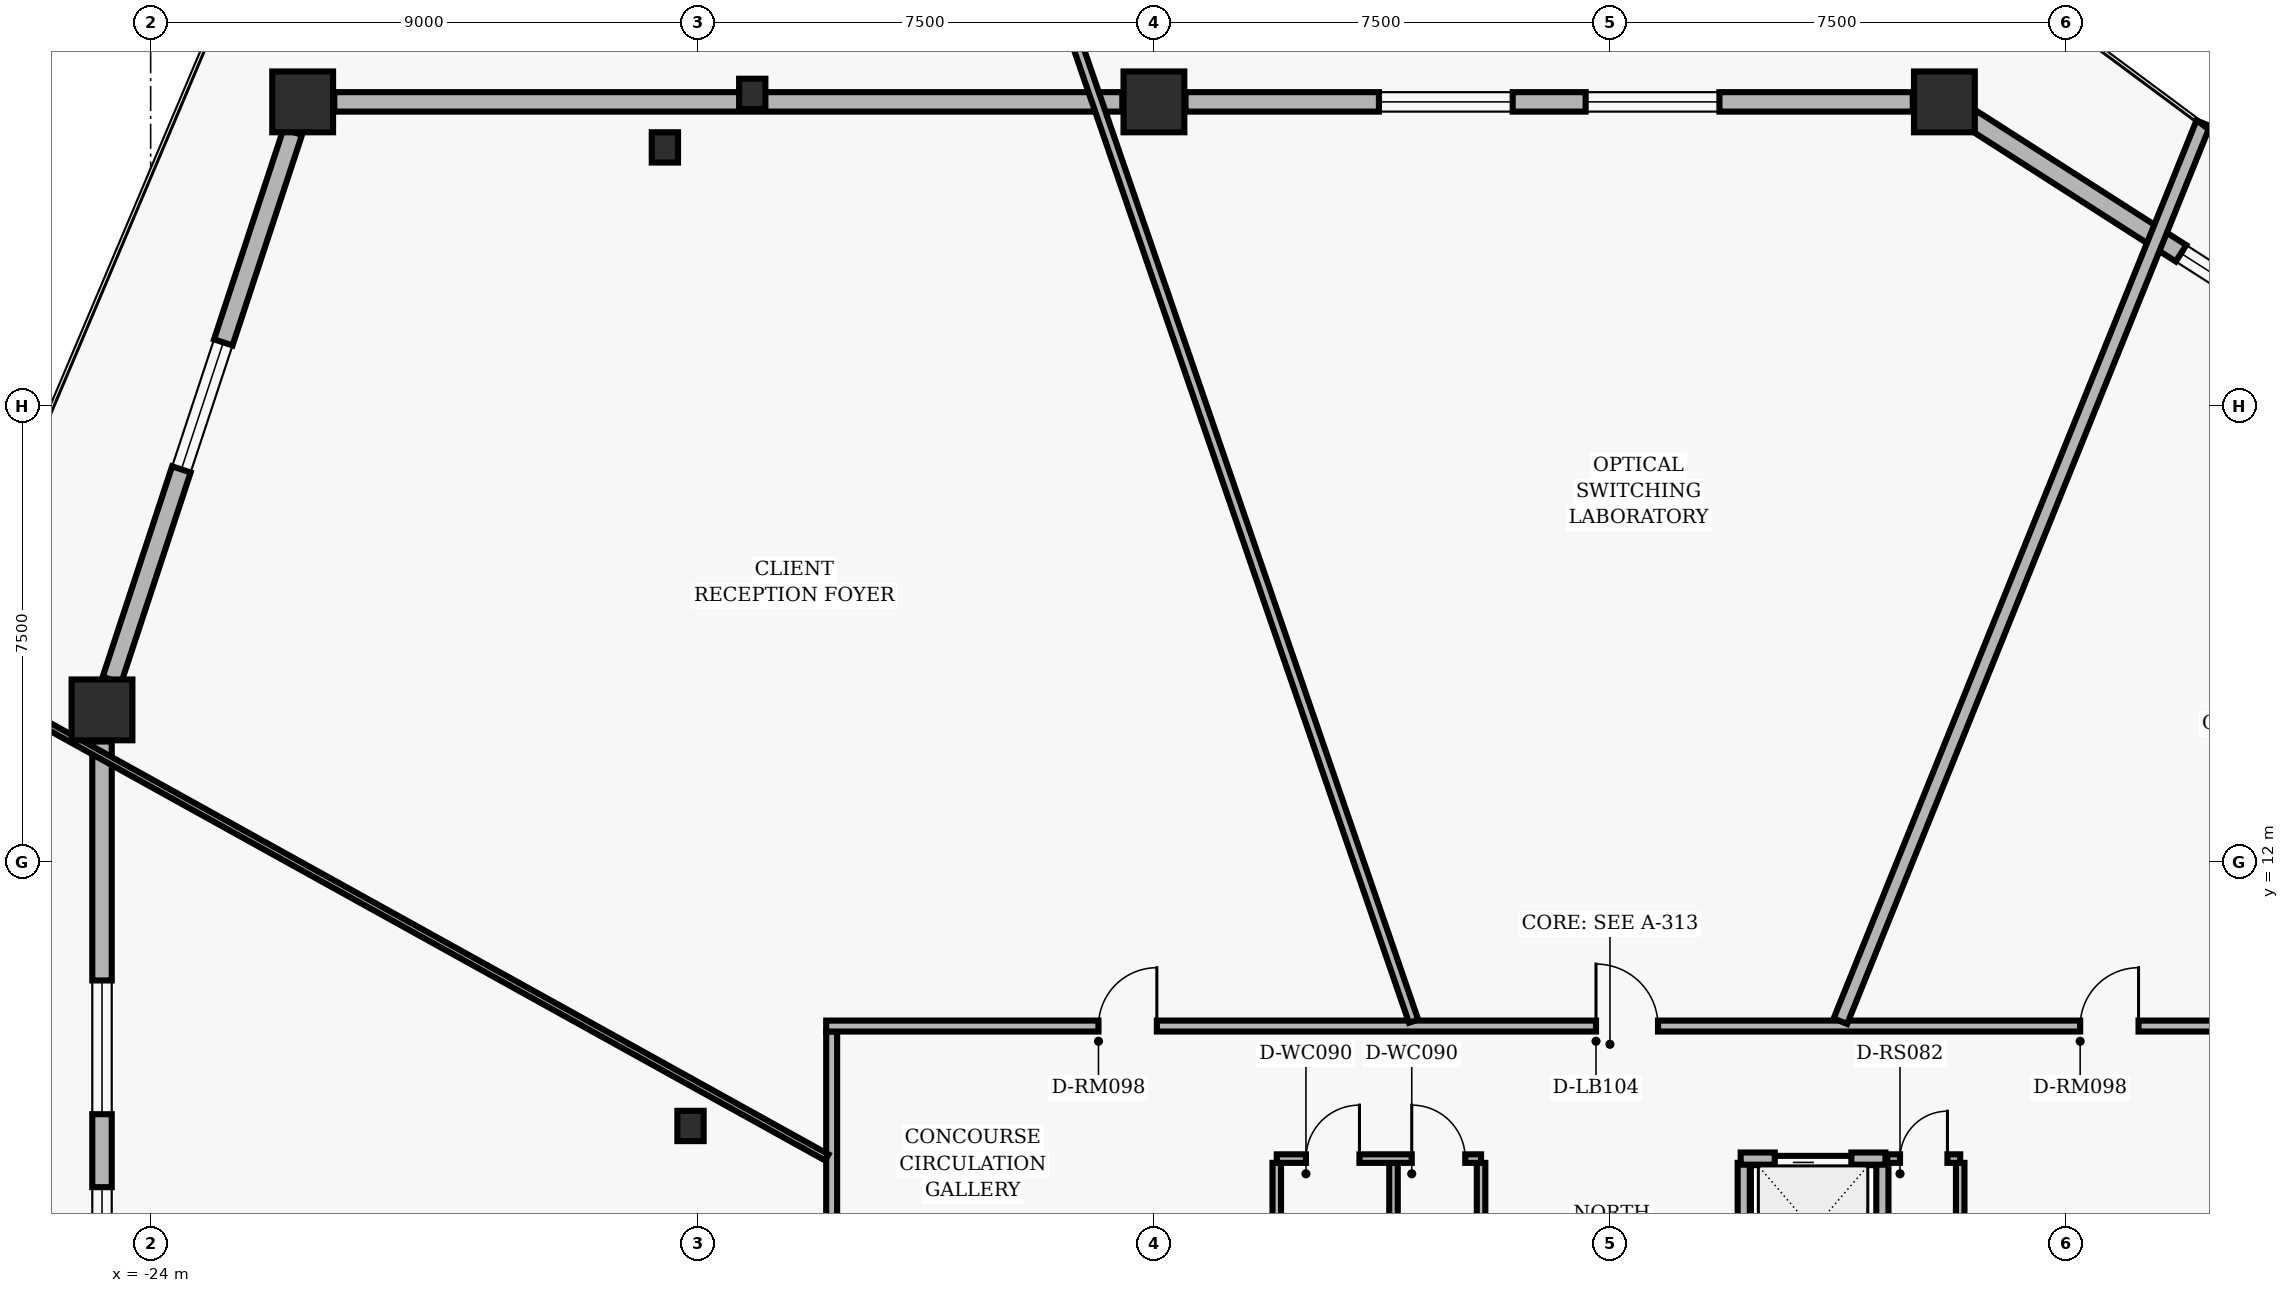
"""IFC4 building model, lengths in metres.
Left out: names, types, materials, properties, quantities, classifications, styles, units other than length and angle.
Written with IfcOpenShell. Run it as: python <this file> out.ifc"""

import sys

from ifc_helpers import new_model, si_unit, direction, frame, frame_2d, origin, origin_2d, place, context, subcontext, project, spatial, rectangle, i_section, extrude, element, fill, save


model = new_model("IFC4")
c1 = context("Model", 3, precision=1e-05, world=origin(), true_north=direction((0.0, 1.0)))
c2 = subcontext(c1, "Body", "Model", "MODEL_VIEW")
j1 = project(units=[si_unit("LENGTHUNIT", "METRE"), si_unit("PLANEANGLEUNIT", "RADIAN")], contexts=[c1])
p1 = place(None, origin())
s1 = spatial("IfcSite", under=j1, at=p1, CompositionType="ELEMENT")
p2 = place(p1, origin())
s2 = spatial("IfcBuilding", under=s1, at=p2, CompositionType="ELEMENT")
p3 = place(p2, frame((0.0, 0.0, 15.36)))
s3 = spatial("IfcBuildingStorey", under=s2, at=p3, CompositionType="ELEMENT", Elevation=15.36)
for number, where, z_axis, x_axis in (
    (1, (5.5, 24.5, 0.0), (0.0, 0.0, 1.0), (1.0, 0.0, 0.0)),
    (2, (-7.5, 24.5, 0.0), (0.0, 0.0, 1.0), (1.0, 0.0, 0.0)),
    (3, (-21.5, 24.5, 0.0), (0.0, 0.0, 1.0), (1.0, 0.0, 0.0)),
    (4, (-24.8, 14.5, 0.0), (0.0, 0.0, 1.0), (1.0, 0.0, 0.0)),
):
    element("IfcColumn", number, at=place(p3, frame(where, z_axis=z_axis, x_axis=x_axis)), inside=s3, PredefinedType="COLUMN", context=c2, shape_type="SweptSolid", body=[
        extrude(rectangle(XDim=1.0, YDim=1.0, at=origin_2d()), origin(), (0.0, 0.0, 1.0), 3.52),
    ])
for number, where, z_axis, x_axis in (
    (5, (-14.106, 24.632, 0.0), (0.0, 0.0, 1.0), (1.0, 0.0, 0.0)),
    (6, (-15.543, 23.751, 0.0), (0.0, 0.0, 1.0), (1.0, 0.0, 0.0)),
    (7, (-15.121, 7.657, 0.0), (0.0, 0.0, 1.0), (1.0, 0.0, 0.0)),
):
    element("IfcColumn", number, at=place(p3, frame(where, z_axis=z_axis, x_axis=x_axis)), inside=s3, PredefinedType="COLUMN", context=c2, shape_type="SweptSolid", body=[
        extrude(i_section(OverallWidth=0.432, OverallDepth=0.498, WebThickness=0.056, FlangeThickness=0.089, FilletRadius=0.025, at=origin_2d()), origin(), (0.0, 0.0, 1.0), 3.52),
    ])
p4 = place(p3, frame((5.938, 24.22, 0.0), z_axis=(0.0, 0.0, 1.0), x_axis=(0.842268830443, -0.539057712368, 0.0)))
e8 = element("IfcWall", 8, at=p4, inside=s3, PredefinedType="SOLIDWALL", context=c2, shape_type="SweptSolid", body=[
    extrude(rectangle(XDim=13.801, YDim=0.32, at=frame_2d((6.9, 0.0))), origin(), (0.0, 0.0, 1.0), 1.65),
])
p5 = place(p4, frame((4.1, 0.0, 0.4)))
e9 = element("IfcOpeningElement", 9, at=p5, cuts=e8, PredefinedType="OPENING", context=c2, shape_type="SweptSolid", body=[
    extrude(rectangle(XDim=2.2, YDim=1.1, at=frame_2d((1.1, 0.55))), frame((0.0, 0.17, 0.0), z_axis=(0.0, -1.0, 0.0), x_axis=(1.0, 0.0, 0.0)), (0.0, 0.0, 1.0), 0.34),
])
p6 = place(p4, frame((7.5, 0.0, 0.4)))
e10 = element("IfcOpeningElement", 10, at=p6, cuts=e8, PredefinedType="OPENING", context=c2, shape_type="SweptSolid", body=[
    extrude(rectangle(XDim=2.2, YDim=1.1, at=frame_2d((1.1, 0.55))), frame((0.0, 0.17, 0.0), z_axis=(0.0, -1.0, 0.0), x_axis=(1.0, 0.0, 0.0)), (0.0, 0.0, 1.0), 0.34),
])
p7 = place(p3, frame((-6.98, 24.5, 0.0), z_axis=(0.0, 0.0, 1.0), x_axis=(1.0, 0.0, 0.0)))
e11 = element("IfcWall", 11, at=p7, inside=s3, PredefinedType="SOLIDWALL", context=c2, shape_type="SweptSolid", body=[
    extrude(rectangle(XDim=11.96, YDim=0.32, at=frame_2d((5.98, 0.0))), origin(), (0.0, 0.0, 1.0), 1.65),
])
p8 = place(p7, frame((3.18, 0.0, 0.4)))
e12 = element("IfcOpeningElement", 12, at=p8, cuts=e11, PredefinedType="OPENING", context=c2, shape_type="SweptSolid", body=[
    extrude(rectangle(XDim=2.2, YDim=1.1, at=frame_2d((1.1, 0.55))), frame((0.0, 0.17, 0.0), z_axis=(0.0, -1.0, 0.0), x_axis=(1.0, 0.0, 0.0)), (0.0, 0.0, 1.0), 0.34),
])
p9 = place(p7, frame((6.58, 0.0, 0.4)))
e13 = element("IfcOpeningElement", 13, at=p9, cuts=e11, PredefinedType="OPENING", context=c2, shape_type="SweptSolid", body=[
    extrude(rectangle(XDim=2.2, YDim=1.1, at=frame_2d((1.1, 0.55))), frame((0.0, 0.17, 0.0), z_axis=(0.0, -1.0, 0.0), x_axis=(1.0, 0.0, 0.0)), (0.0, 0.0, 1.0), 0.34),
])
p10 = place(p3, frame((-20.98, 24.5, 0.0), z_axis=(0.0, 0.0, 1.0), x_axis=(1.0, 0.0, 0.0)))
e14 = element("IfcWall", 14, at=p10, inside=s3, PredefinedType="SOLIDWALL", context=c2, shape_type="SweptSolid", body=[
    extrude(rectangle(XDim=12.96, YDim=0.32, at=frame_2d((6.48, 0.0))), origin(), (0.0, 0.0, 1.0), 1.65),
])
p11 = place(p3, frame((-24.637, 14.994, 0.0), z_axis=(0.0, 0.0, 1.0), x_axis=(0.313363070681, 0.949633395544, 0.0)))
e15 = element("IfcWall", 15, at=p11, inside=s3, PredefinedType="SOLIDWALL", context=c2, shape_type="SweptSolid", body=[
    extrude(rectangle(XDim=9.49, YDim=0.32, at=frame_2d((4.745, 0.0))), origin(), (0.0, 0.0, 1.0), 1.65),
])
p12 = place(p11, frame((3.645, 0.0, 0.4)))
e16 = element("IfcOpeningElement", 16, at=p12, cuts=e15, PredefinedType="OPENING", context=c2, shape_type="SweptSolid", body=[
    extrude(rectangle(XDim=2.2, YDim=1.1, at=frame_2d((1.1, 0.55))), frame((0.0, 0.17, 0.0), z_axis=(0.0, -1.0, 0.0), x_axis=(1.0, 0.0, 0.0)), (0.0, 0.0, 1.0), 0.34),
])
p13 = place(p3, frame((-24.8, 0.52, 0.0), z_axis=(0.0, 0.0, 1.0), x_axis=(0.0, 1.0, 0.0)))
e17 = element("IfcWall", 17, at=p13, inside=s3, PredefinedType="SOLIDWALL", context=c2, shape_type="SweptSolid", body=[
    extrude(rectangle(XDim=13.46, YDim=0.32, at=frame_2d((6.73, 0.0))), origin(), (0.0, 0.0, 1.0), 1.65),
])
p14 = place(p13, frame((3.93, 0.0, 0.4)))
e18 = element("IfcOpeningElement", 18, at=p14, cuts=e17, PredefinedType="OPENING", context=c2, shape_type="SweptSolid", body=[
    extrude(rectangle(XDim=2.2, YDim=1.1, at=frame_2d((1.1, 0.55))), frame((0.0, 0.17, 0.0), z_axis=(0.0, -1.0, 0.0), x_axis=(1.0, 0.0, 0.0)), (0.0, 0.0, 1.0), 0.34),
])
p15 = place(p13, frame((7.33, 0.0, 0.4)))
e19 = element("IfcOpeningElement", 19, at=p15, cuts=e17, PredefinedType="OPENING", context=c2, shape_type="SweptSolid", body=[
    extrude(rectangle(XDim=2.2, YDim=1.1, at=frame_2d((1.1, 0.55))), frame((0.0, 0.17, 0.0), z_axis=(0.0, -1.0, 0.0), x_axis=(1.0, 0.0, 0.0)), (0.0, 0.0, 1.0), 0.34),
])
for number, where, z_axis, x_axis in (
    (20, (2.2, 4.95, 0.0), (0.0, 0.0, 1.0), (0.0, 1.0, 0.0)),
    (21, (4.48, 4.95, 0.0), (0.0, 0.0, 1.0), (0.0, 1.0, 0.0)),
):
    element("IfcWall", number, at=place(p3, frame(where, z_axis=z_axis, x_axis=x_axis)), inside=s3, PredefinedType="PARTITIONING", context=c2, shape_type="SweptSolid", body=[
        extrude(rectangle(XDim=2.1, YDim=0.2, at=frame_2d((1.05, 0.0))), origin(), (0.0, 0.0, 1.0), 3.073),
    ])
p16 = place(p3, frame((2.15, 7.12, 0.0), z_axis=(0.0, 0.0, 1.0), x_axis=(1.0, 0.0, 0.0)))
e22 = element("IfcWall", 22, at=p16, inside=s3, PredefinedType="PARTITIONING", context=c2, shape_type="SweptSolid", body=[
    extrude(rectangle(XDim=2.38, YDim=0.2, at=frame_2d((1.19, 0.0))), origin(), (0.0, 0.0, 1.0), 2.587),
])
p17 = place(p16, frame((0.56, 0.0, 0.0)))
e23 = element("IfcOpeningElement", 23, at=p17, cuts=e22, PredefinedType="OPENING", context=c2, shape_type="SweptSolid", body=[
    extrude(rectangle(XDim=1.26, YDim=2.06, at=frame_2d((0.63, 1.03))), frame((0.0, 0.11, 0.0), z_axis=(0.0, -1.0, 0.0), x_axis=(1.0, 0.0, 0.0)), (0.0, 0.0, 1.0), 0.22),
])
for number, where, z_axis, x_axis in (
    (24, (-5.48, 4.95, 0.0), (0.0, 0.0, 1.0), (0.0, 1.0, 0.0)),
    (25, (-3.56, 4.95, 0.0), (0.0, 0.0, 1.0), (0.0, 1.0, 0.0)),
    (26, (-2.12, 4.95, 0.0), (0.0, 0.0, 1.0), (0.0, 1.0, 0.0)),
):
    element("IfcWall", number, at=place(p3, frame(where, z_axis=z_axis, x_axis=x_axis)), inside=s3, PredefinedType="PARTITIONING", context=c2, shape_type="SweptSolid", body=[
        extrude(rectangle(XDim=2.1, YDim=0.14, at=frame_2d((1.05, 0.0))), origin(), (0.0, 0.0, 1.0), 3.073),
    ])
p18 = place(p3, frame((-5.48, 7.12, 0.0), z_axis=(0.0, 0.0, 1.0), x_axis=(1.0, 0.0, 0.0)))
e27 = element("IfcWall", 27, at=p18, inside=s3, PredefinedType="PARTITIONING", context=c2, shape_type="SweptSolid", body=[
    extrude(rectangle(XDim=3.36, YDim=0.14, at=frame_2d((1.68, 0.0))), origin(), (0.0, 0.0, 1.0), 3.073),
])
p19 = place(p18, frame((0.48, 0.0, 0.0)))
e28 = element("IfcOpeningElement", 28, at=p19, cuts=e27, PredefinedType="OPENING", context=c2, shape_type="SweptSolid", body=[
    extrude(rectangle(XDim=0.88, YDim=2.02, at=frame_2d((0.44, 1.01))), frame((0.0, 0.08, 0.0), z_axis=(0.0, -1.0, 0.0), x_axis=(1.0, 0.0, 0.0)), (0.0, 0.0, 1.0), 0.16),
])
p20 = place(p18, frame((2.22, 0.0, 0.0)))
e29 = element("IfcOpeningElement", 29, at=p20, cuts=e27, PredefinedType="OPENING", context=c2, shape_type="SweptSolid", body=[
    extrude(rectangle(XDim=0.88, YDim=2.02, at=frame_2d((0.44, 1.01))), frame((0.0, 0.08, 0.0), z_axis=(0.0, -1.0, 0.0), x_axis=(1.0, 0.0, 0.0)), (0.0, 0.0, 1.0), 0.16),
])
p21 = place(p3, frame((5.76, 4.95, 0.0), z_axis=(0.0, 0.0, 1.0), x_axis=(0.0, 1.0, 0.0)))
e30 = element("IfcWall", 30, at=p21, inside=s3, PredefinedType="PARTITIONING", context=c2, shape_type="SweptSolid", body=[
    extrude(rectangle(XDim=2.1, YDim=0.14, at=frame_2d((1.05, 0.0))), origin(), (0.0, 0.0, 1.0), 2.198),
])
p22 = place(p3, frame((4.56, 7.12, 0.0), z_axis=(0.0, 0.0, 1.0), x_axis=(1.0, 0.0, 0.0)))
e31 = element("IfcWall", 31, at=p22, inside=s3, PredefinedType="PARTITIONING", context=c2, shape_type="SweptSolid", body=[
    extrude(rectangle(XDim=1.2, YDim=0.14, at=frame_2d((0.6, 0.0))), origin(), (0.0, 0.0, 1.0), 2.587),
])
p23 = place(p22, frame((0.21, 0.0, 0.0)))
e32 = element("IfcOpeningElement", 32, at=p23, cuts=e31, PredefinedType="OPENING", context=c2, shape_type="SweptSolid", body=[
    extrude(rectangle(XDim=0.78, YDim=2.01, at=frame_2d((0.39, 1.005))), frame((0.0, 0.08, 0.0), z_axis=(0.0, -1.0, 0.0), x_axis=(1.0, 0.0, 0.0)), (0.0, 0.0, 1.0), 0.16),
])
p24 = place(p3, frame((-12.8, -3.61, 0.0), z_axis=(0.0, 0.0, 1.0), x_axis=(0.0, 1.0, 0.0)))
e33 = element("IfcWall", 33, at=p24, inside=s3, PredefinedType="PARTITIONING", context=c2, shape_type="SweptSolid", body=[
    extrude(rectangle(XDim=12.82, YDim=0.18, at=frame_2d((6.41, 0.0))), origin(), (0.0, 0.0, 1.0), 3.073),
])
p25 = place(p24, frame((5.027, 0.0, 0.0)))
e34 = element("IfcOpeningElement", 34, at=p25, cuts=e33, PredefinedType="OPENING", context=c2, shape_type="SweptSolid", body=[
    extrude(rectangle(XDim=0.96, YDim=2.02, at=frame_2d((0.48, 1.01))), frame((0.0, 0.1, 0.0), z_axis=(0.0, -1.0, 0.0), x_axis=(1.0, 0.0, 0.0)), (0.0, 0.0, 1.0), 0.2),
])
p26 = place(p3, frame((-12.89, 9.3, 0.0), z_axis=(0.0, 0.0, 1.0), x_axis=(1.0, 0.0, 0.0)))
e35 = element("IfcWall", 35, at=p26, inside=s3, PredefinedType="PARTITIONING", context=c2, shape_type="SweptSolid", body=[
    extrude(rectangle(XDim=25.78, YDim=0.18, at=frame_2d((12.89, 0.0))), origin(), (0.0, 0.0, 1.0), 2.587),
])
p27 = place(p26, frame((20.623, 0.0, 0.0)))
e36 = element("IfcOpeningElement", 36, at=p27, cuts=e35, PredefinedType="OPENING", context=c2, shape_type="SweptSolid", body=[
    extrude(rectangle(XDim=0.96, YDim=2.02, at=frame_2d((0.48, 1.01))), frame((0.0, 0.1, 0.0), z_axis=(0.0, -1.0, 0.0), x_axis=(1.0, 0.0, 0.0)), (0.0, 0.0, 1.0), 0.2),
])
p28 = place(p26, frame((12.66, 0.0, 0.0)))
e37 = element("IfcOpeningElement", 37, at=p28, cuts=e35, PredefinedType="OPENING", context=c2, shape_type="SweptSolid", body=[
    extrude(rectangle(XDim=1.02, YDim=2.02, at=frame_2d((0.51, 1.01))), frame((0.0, 0.1, 0.0), z_axis=(0.0, -1.0, 0.0), x_axis=(1.0, 0.0, 0.0)), (0.0, 0.0, 1.0), 0.2),
])
p29 = place(p26, frame((4.478, 0.0, 0.0)))
e38 = element("IfcOpeningElement", 38, at=p29, cuts=e35, PredefinedType="OPENING", context=c2, shape_type="SweptSolid", body=[
    extrude(rectangle(XDim=0.96, YDim=2.02, at=frame_2d((0.48, 1.01))), frame((0.0, 0.1, 0.0), z_axis=(0.0, -1.0, 0.0), x_axis=(1.0, 0.0, 0.0)), (0.0, 0.0, 1.0), 0.2),
])
p30 = place(p3, frame((3.79, 9.38, 0.0), z_axis=(0.0, 0.0, 1.0), x_axis=(0.374596599421, 0.92718789234, 0.0)))
e39 = element("IfcWall", 39, at=p30, inside=s3, PredefinedType="PARTITIONING", context=c2, shape_type="SweptSolid", body=[
    extrude(rectangle(XDim=15.929, YDim=0.24, at=frame_2d((7.964, 0.0))), origin(), (0.0, 0.0, 1.0), 3.073),
])
p31 = place(p3, frame((-3.23, 9.38, 0.0), z_axis=(0.0, 0.0, 1.0), x_axis=(-0.325566886221, 0.945519012287, 0.0)))
e40 = element("IfcWall", 40, at=p31, inside=s3, PredefinedType="PARTITIONING", context=c2, shape_type="SweptSolid", body=[
    extrude(rectangle(XDim=18.572, YDim=0.16, at=frame_2d((9.286, 0.0))), origin(), (0.0, 0.0, 1.0), 1.893),
])
p32 = place(p3, frame((-12.88, 7.139, 0.0), z_axis=(0.0, 0.0, 1.0), x_axis=(-0.874620150807, 0.484808819848, 0.0)))
e41 = element("IfcWall", 41, at=p32, inside=s3, PredefinedType="MOVABLE", context=c2, shape_type="SweptSolid", body=[
    extrude(rectangle(XDim=15.561, YDim=0.115, at=frame_2d((7.781, 0.0))), origin(), (0.0, 0.0, 1.0), 1.893),
])
p33 = place(p5, origin())
e42 = element("IfcWindow", 42, at=p33, inside=s3, PartitioningType="SINGLE_PANEL", PredefinedType="WINDOW", context=c2, shape_type="SweptSolid", body=[
    extrude(rectangle(XDim=2.2, YDim=1.1, at=frame_2d((1.1, 0.55))), frame((0.0, 0.03, 0.0), z_axis=(0.0, -1.0, 0.0), x_axis=(1.0, 0.0, 0.0)), (0.0, 0.0, 1.0), 0.06),
])
fill(e9, e42)
p34 = place(p8, origin())
e43 = element("IfcWindow", 43, at=p34, inside=s3, PartitioningType="SINGLE_PANEL", PredefinedType="WINDOW", context=c2, shape_type="SweptSolid", body=[
    extrude(rectangle(XDim=2.2, YDim=1.1, at=frame_2d((1.1, 0.55))), frame((0.0, 0.03, 0.0), z_axis=(0.0, -1.0, 0.0), x_axis=(1.0, 0.0, 0.0)), (0.0, 0.0, 1.0), 0.06),
])
fill(e12, e43)
p35 = place(p9, origin())
e44 = element("IfcWindow", 44, at=p35, inside=s3, PartitioningType="SINGLE_PANEL", PredefinedType="WINDOW", context=c2, shape_type="SweptSolid", body=[
    extrude(rectangle(XDim=2.2, YDim=1.1, at=frame_2d((1.1, 0.55))), frame((0.0, 0.03, 0.0), z_axis=(0.0, -1.0, 0.0), x_axis=(1.0, 0.0, 0.0)), (0.0, 0.0, 1.0), 0.06),
])
fill(e13, e44)
p36 = place(p12, origin())
e45 = element("IfcWindow", 45, at=p36, inside=s3, PartitioningType="SINGLE_PANEL", PredefinedType="WINDOW", context=c2, shape_type="SweptSolid", body=[
    extrude(rectangle(XDim=2.2, YDim=1.1, at=frame_2d((1.1, 0.55))), frame((0.0, 0.03, 0.0), z_axis=(0.0, -1.0, 0.0), x_axis=(1.0, 0.0, 0.0)), (0.0, 0.0, 1.0), 0.06),
])
fill(e16, e45)
p37 = place(p14, origin())
e46 = element("IfcWindow", 46, at=p37, inside=s3, PartitioningType="SINGLE_PANEL", PredefinedType="WINDOW", context=c2, shape_type="SweptSolid", body=[
    extrude(rectangle(XDim=2.2, YDim=1.1, at=frame_2d((1.1, 0.55))), frame((0.0, 0.03, 0.0), z_axis=(0.0, -1.0, 0.0), x_axis=(1.0, 0.0, 0.0)), (0.0, 0.0, 1.0), 0.06),
])
fill(e18, e46)
p38 = place(p15, origin())
e47 = element("IfcWindow", 47, at=p38, inside=s3, PartitioningType="SINGLE_PANEL", PredefinedType="WINDOW", context=c2, shape_type="SweptSolid", body=[
    extrude(rectangle(XDim=2.2, YDim=1.1, at=frame_2d((1.1, 0.55))), frame((0.0, 0.03, 0.0), z_axis=(0.0, -1.0, 0.0), x_axis=(1.0, 0.0, 0.0)), (0.0, 0.0, 1.0), 0.06),
])
fill(e19, e47)
p39 = place(p17, origin())
e48 = element("IfcDoor", 48, at=p39, inside=s3, OperationType="SLIDING_TO_LEFT", PredefinedType="DOOR", context=c2, shape_type="SweptSolid", body=[
    extrude(rectangle(XDim=1.26, YDim=2.06, at=frame_2d((0.63, 1.03))), frame((0.0, 0.025, 0.0), z_axis=(0.0, -1.0, 0.0), x_axis=(1.0, 0.0, 0.0)), (0.0, 0.0, 1.0), 0.05),
])
fill(e23, e48)
p40 = place(p19, origin())
e49 = element("IfcDoor", 49, at=p40, inside=s3, OperationType="SINGLE_SWING_RIGHT", PredefinedType="DOOR", context=c2, shape_type="SweptSolid", body=[
    extrude(rectangle(XDim=0.88, YDim=2.02, at=frame_2d((0.44, 1.01))), frame((0.0, 0.025, 0.0), z_axis=(0.0, -1.0, 0.0), x_axis=(1.0, 0.0, 0.0)), (0.0, 0.0, 1.0), 0.05),
])
fill(e28, e49)
p41 = place(p20, origin())
e50 = element("IfcDoor", 50, at=p41, inside=s3, OperationType="SINGLE_SWING_LEFT", PredefinedType="DOOR", context=c2, shape_type="SweptSolid", body=[
    extrude(rectangle(XDim=0.88, YDim=2.02, at=frame_2d((0.44, 1.01))), frame((0.0, 0.025, 0.0), z_axis=(0.0, -1.0, 0.0), x_axis=(1.0, 0.0, 0.0)), (0.0, 0.0, 1.0), 0.05),
])
fill(e29, e50)
p42 = place(p23, origin())
e51 = element("IfcDoor", 51, at=p42, inside=s3, OperationType="SINGLE_SWING_RIGHT", PredefinedType="DOOR", context=c2, shape_type="SweptSolid", body=[
    extrude(rectangle(XDim=0.78, YDim=2.01, at=frame_2d((0.39, 1.005))), frame((0.0, 0.025, 0.0), z_axis=(0.0, -1.0, 0.0), x_axis=(1.0, 0.0, 0.0)), (0.0, 0.0, 1.0), 0.05),
])
fill(e32, e51)
p43 = place(p27, origin())
e52 = element("IfcDoor", 52, at=p43, inside=s3, OperationType="SINGLE_SWING_RIGHT", PredefinedType="DOOR", context=c2, shape_type="SweptSolid", body=[
    extrude(rectangle(XDim=0.96, YDim=2.02, at=frame_2d((0.48, 1.01))), frame((0.0, 0.025, 0.0), z_axis=(0.0, -1.0, 0.0), x_axis=(1.0, 0.0, 0.0)), (0.0, 0.0, 1.0), 0.05),
])
fill(e36, e52)
p44 = place(p28, origin())
e53 = element("IfcDoor", 53, at=p44, inside=s3, OperationType="SINGLE_SWING_LEFT", PredefinedType="DOOR", context=c2, shape_type="SweptSolid", body=[
    extrude(rectangle(XDim=1.02, YDim=2.02, at=frame_2d((0.51, 1.01))), frame((0.0, 0.025, 0.0), z_axis=(0.0, -1.0, 0.0), x_axis=(1.0, 0.0, 0.0)), (0.0, 0.0, 1.0), 0.05),
])
fill(e37, e53)
p45 = place(p29, origin())
e54 = element("IfcDoor", 54, at=p45, inside=s3, OperationType="SINGLE_SWING_RIGHT", PredefinedType="DOOR", context=c2, shape_type="SweptSolid", body=[
    extrude(rectangle(XDim=0.96, YDim=2.02, at=frame_2d((0.48, 1.01))), frame((0.0, 0.025, 0.0), z_axis=(0.0, -1.0, 0.0), x_axis=(1.0, 0.0, 0.0)), (0.0, 0.0, 1.0), 0.05),
])
fill(e38, e54)
save(model, sys.argv[1])
